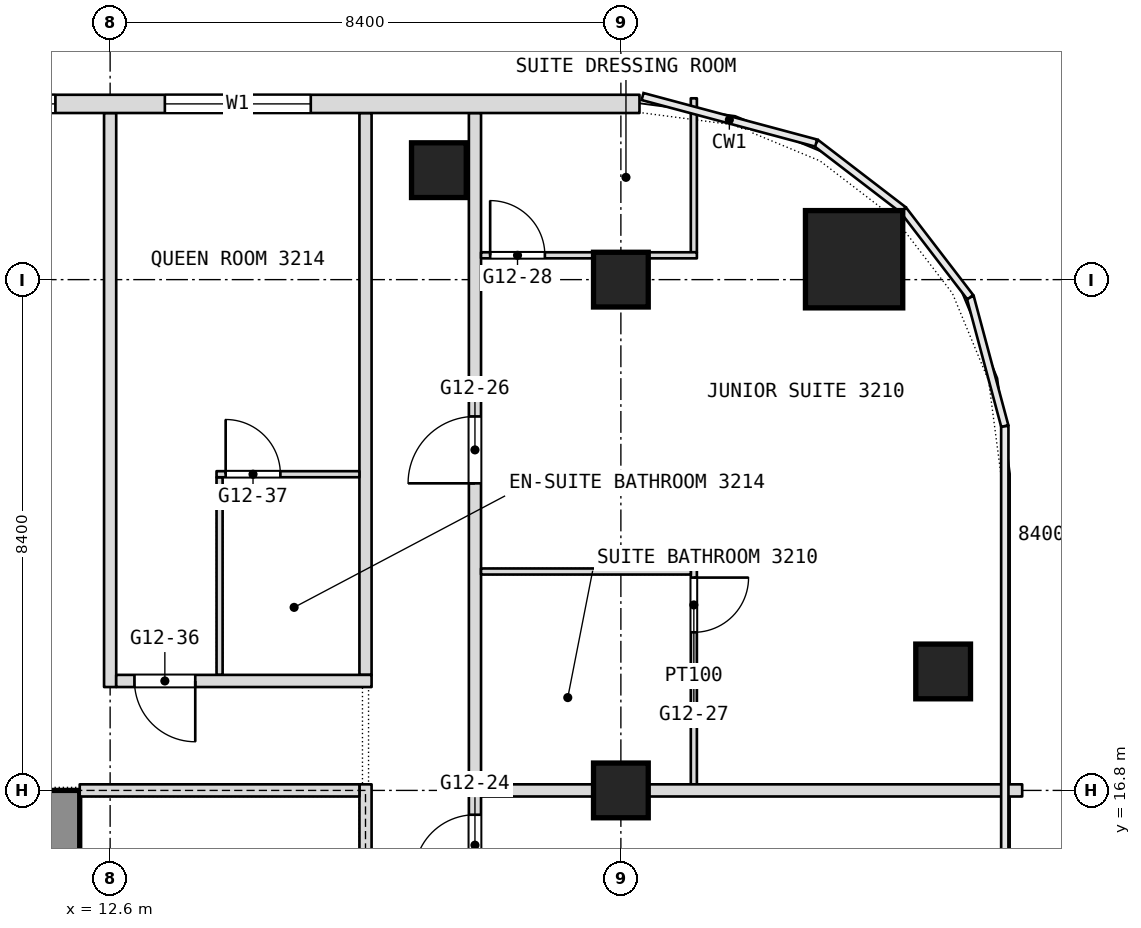
"""IFC4 building model, lengths in metres.
Left out: names, types, materials, properties, quantities, classifications, styles, units other than length and angle.
Written with IfcOpenShell. Run it as: python <this file> out.ifc"""

import sys

from ifc_helpers import new_model, si_unit, direction, frame, frame_2d, origin, origin_2d, place, context, subcontext, project, spatial, rectangle, extrude, element, fill, save


model = new_model("IFC4")
c1 = context("Model", 3, precision=1e-05, world=origin(), true_north=direction((0.0, 1.0)))
c2 = subcontext(c1, "Body", "Model", "MODEL_VIEW")
j1 = project(units=[si_unit("LENGTHUNIT", "METRE"), si_unit("PLANEANGLEUNIT", "RADIAN")], contexts=[c1])
p1 = place(None, origin())
s1 = spatial("IfcSite", under=j1, at=p1, CompositionType="ELEMENT")
p2 = place(p1, origin())
s2 = spatial("IfcBuilding", under=s1, at=p2, CompositionType="ELEMENT")
p3 = place(p2, frame((0.0, 0.0, 140.9)))
s3 = spatial("IfcBuildingStorey", under=s2, at=p3, CompositionType="ELEMENT", Elevation=140.9)
p4 = place(p3, frame((11.6, 0.0, 0.0), z_axis=(0.0, 0.0, 1.0), x_axis=(0.0, 1.0, 0.0)))
e1 = element("IfcWall", 1, at=p4, inside=s3, PredefinedType="SHEAR", context=c2, shape_type="SweptSolid", body=[
    extrude(rectangle(XDim=16.8, YDim=1.0, at=frame_2d((8.4, 0.0))), origin(), (0.0, 0.0, 1.0), 3.6),
])
p5 = place(p4, frame((2.3, 0.0, 0.0)))
e2 = element("IfcOpeningElement", 2, at=p5, cuts=e1, PredefinedType="OPENING", context=c2, shape_type="SweptSolid", body=[
    extrude(rectangle(XDim=1.1, YDim=2.1, at=frame_2d((0.55, 1.05))), frame((0.0, 0.5, 0.0), z_axis=(0.0, -1.0, 0.0), x_axis=(1.0, 0.0, 0.0)), (0.0, 0.0, 1.0), 1.0),
])
p6 = place(p4, frame((4.85, 0.0, 0.0)))
e3 = element("IfcOpeningElement", 3, at=p6, cuts=e1, PredefinedType="OPENING", context=c2, shape_type="SweptSolid", body=[
    extrude(rectangle(XDim=1.1, YDim=2.1, at=frame_2d((0.55, 1.05))), frame((0.0, 0.5, 0.0), z_axis=(0.0, -1.0, 0.0), x_axis=(1.0, 0.0, 0.0)), (0.0, 0.0, 1.0), 1.0),
])
p7 = place(p4, frame((6.825, 0.0, 0.0)))
e4 = element("IfcOpeningElement", 4, at=p7, cuts=e1, PredefinedType="OPENING", context=c2, shape_type="SweptSolid", body=[
    extrude(rectangle(XDim=1.2, YDim=2.1, at=frame_2d((0.6, 1.05))), frame((0.0, 0.5, 0.0), z_axis=(0.0, -1.0, 0.0), x_axis=(1.0, 0.0, 0.0)), (0.0, 0.0, 1.0), 1.0),
])
p8 = place(p4, frame((13.4, 0.0, 0.0)))
e5 = element("IfcOpeningElement", 5, at=p8, cuts=e1, PredefinedType="OPENING", context=c2, shape_type="SweptSolid", body=[
    extrude(rectangle(XDim=1.1, YDim=2.1, at=frame_2d((0.55, 1.05))), frame((0.0, 0.5, 0.0), z_axis=(0.0, -1.0, 0.0), x_axis=(1.0, 0.0, 0.0)), (0.0, 0.0, 1.0), 1.0),
])
p9 = place(p4, frame((10.85, 0.0, 0.0)))
e6 = element("IfcOpeningElement", 6, at=p9, cuts=e1, PredefinedType="OPENING", context=c2, shape_type="SweptSolid", body=[
    extrude(rectangle(XDim=1.1, YDim=2.1, at=frame_2d((0.55, 1.05))), frame((0.0, 0.5, 0.0), z_axis=(0.0, -1.0, 0.0), x_axis=(1.0, 0.0, 0.0)), (0.0, 0.0, 1.0), 1.0),
])
p10 = place(p4, frame((8.775, 0.0, 0.0)))
e7 = element("IfcOpeningElement", 7, at=p10, cuts=e1, PredefinedType="OPENING", context=c2, shape_type="SweptSolid", body=[
    extrude(rectangle(XDim=1.2, YDim=2.1, at=frame_2d((0.6, 1.05))), frame((0.0, 0.5, 0.0), z_axis=(0.0, -1.0, 0.0), x_axis=(1.0, 0.0, 0.0)), (0.0, 0.0, 1.0), 1.0),
])
p11 = place(p3, frame((24.835, 25.535, 0.0), z_axis=(0.0, 0.0, 1.0), x_axis=(1.0, 0.0, 0.0)))
e8 = element("IfcColumn", 8, at=p11, inside=s3, PredefinedType="COLUMN", context=c2, shape_type="SweptSolid", body=[
    extrude(rectangle(XDim=1.6, YDim=1.6, at=origin_2d()), origin(), (0.0, 0.0, 1.0), 3.6),
])
for number, where, z_axis, x_axis in (
    (9, (21.0, 16.8, 0.0), (0.0, 0.0, 1.0), (1.0, 0.0, 0.0)),
    (10, (21.0, 25.2, 0.0), (0.0, 0.0, 1.0), (1.0, 0.0, 0.0)),
    (11, (18.007, 27.0, 0.0), (0.0, 0.0, 1.0), (1.0, 0.0, 0.0)),
    (12, (26.3, 18.756, 0.0), (0.0, 0.0, 1.0), (1.0, 0.0, 0.0)),
):
    element("IfcColumn", number, at=place(p3, frame(where, z_axis=z_axis, x_axis=x_axis)), inside=s3, PredefinedType="COLUMN", context=c2, shape_type="SweptSolid", body=[
        extrude(rectangle(XDim=0.9, YDim=0.9, at=origin_2d()), origin(), (0.0, 0.0, 1.0), 3.6),
    ])
p12 = place(p3, frame((22.2, 16.9, 0.0), z_axis=(0.0, 0.0, 1.0), x_axis=(0.0, 1.0, 0.0)))
e13 = element("IfcWall", 13, at=p12, inside=s3, PredefinedType="PARTITIONING", context=c2, shape_type="SweptSolid", body=[
    extrude(rectangle(XDim=3.55, YDim=0.1, at=frame_2d((1.775, 0.0))), origin(), (0.0, 0.0, 1.0), 3.34),
])
p13 = place(p12, frame((2.5, 0.0, 0.0)))
e14 = element("IfcOpeningElement", 14, at=p13, cuts=e13, PredefinedType="OPENING", context=c2, shape_type="SweptSolid", body=[
    extrude(rectangle(XDim=0.9, YDim=2.1, at=frame_2d((0.45, 1.05))), frame((0.0, 0.05, 0.0), z_axis=(0.0, -1.0, 0.0), x_axis=(1.0, 0.0, 0.0)), (0.0, 0.0, 1.0), 0.1),
])
p14 = place(p3, frame((22.2, 25.65, 0.0), z_axis=(0.0, 0.0, 1.0), x_axis=(0.0, 1.0, 0.0)))
e15 = element("IfcWall", 15, at=p14, inside=s3, PredefinedType="PARTITIONING", context=c2, shape_type="SweptSolid", body=[
    extrude(rectangle(XDim=2.532, YDim=0.1, at=frame_2d((1.266, 0.0))), origin(), (0.0, 0.0, 1.0), 3.34),
])
p15 = place(p3, frame((18.6, -21.708, 0.0), z_axis=(0.0, 0.0, 1.0), x_axis=(0.0, 1.0, 0.0)))
e16 = element("IfcWall", 16, at=p15, inside=s3, PredefinedType="PARTITIONING", context=c2, shape_type="SweptSolid", body=[
    extrude(rectangle(XDim=49.648, YDim=0.2, at=frame_2d((24.824, 0.0))), origin(), (0.0, 0.0, 1.0), 3.34),
])
p16 = place(p15, frame((2.8, 0.0, 0.0)))
e17 = element("IfcOpeningElement", 17, at=p16, cuts=e16, PredefinedType="OPENING", context=c2, shape_type="SweptSolid", body=[
    extrude(rectangle(XDim=1.0, YDim=2.1, at=frame_2d((0.5, 1.05))), frame((0.0, 0.1, 0.0), z_axis=(0.0, -1.0, 0.0), x_axis=(1.0, 0.0, 0.0)), (0.0, 0.0, 1.0), 0.2),
])
p17 = place(p15, frame((7.708, 0.0, 0.0)))
e18 = element("IfcOpeningElement", 18, at=p17, cuts=e16, PredefinedType="OPENING", context=c2, shape_type="SweptSolid", body=[
    extrude(rectangle(XDim=1.0, YDim=2.1, at=frame_2d((0.5, 1.05))), frame((0.0, 0.1, 0.0), z_axis=(0.0, -1.0, 0.0), x_axis=(1.0, 0.0, 0.0)), (0.0, 0.0, 1.0), 0.2),
])
p18 = place(p15, frame((9.508, 0.0, 0.0)))
e19 = element("IfcOpeningElement", 19, at=p18, cuts=e16, PredefinedType="OPENING", context=c2, shape_type="SweptSolid", body=[
    extrude(rectangle(XDim=1.0, YDim=2.1, at=frame_2d((0.5, 1.05))), frame((0.0, 0.1, 0.0), z_axis=(0.0, -1.0, 0.0), x_axis=(1.0, 0.0, 0.0)), (0.0, 0.0, 1.0), 0.2),
])
p19 = place(p15, frame((13.708, 0.0, 0.0)))
e20 = element("IfcOpeningElement", 20, at=p19, cuts=e16, PredefinedType="OPENING", context=c2, shape_type="SweptSolid", body=[
    extrude(rectangle(XDim=1.0, YDim=2.1, at=frame_2d((0.5, 1.05))), frame((0.0, 0.1, 0.0), z_axis=(0.0, -1.0, 0.0), x_axis=(1.0, 0.0, 0.0)), (0.0, 0.0, 1.0), 0.2),
])
p20 = place(p15, frame((20.308, 0.0, 0.0)))
e21 = element("IfcOpeningElement", 21, at=p20, cuts=e16, PredefinedType="OPENING", context=c2, shape_type="SweptSolid", body=[
    extrude(rectangle(XDim=1.0, YDim=2.1, at=frame_2d((0.5, 1.05))), frame((0.0, 0.1, 0.0), z_axis=(0.0, -1.0, 0.0), x_axis=(1.0, 0.0, 0.0)), (0.0, 0.0, 1.0), 0.2),
])
p21 = place(p15, frame((24.508, 0.0, 0.0)))
e22 = element("IfcOpeningElement", 22, at=p21, cuts=e16, PredefinedType="OPENING", context=c2, shape_type="SweptSolid", body=[
    extrude(rectangle(XDim=1.0, YDim=2.1, at=frame_2d((0.5, 1.05))), frame((0.0, 0.1, 0.0), z_axis=(0.0, -1.0, 0.0), x_axis=(1.0, 0.0, 0.0)), (0.0, 0.0, 1.0), 0.2),
])
p22 = place(p15, frame((26.308, 0.0, 0.0)))
e23 = element("IfcOpeningElement", 23, at=p22, cuts=e16, PredefinedType="OPENING", context=c2, shape_type="SweptSolid", body=[
    extrude(rectangle(XDim=1.0, YDim=2.1, at=frame_2d((0.5, 1.05))), frame((0.0, 0.1, 0.0), z_axis=(0.0, -1.0, 0.0), x_axis=(1.0, 0.0, 0.0)), (0.0, 0.0, 1.0), 0.2),
])
p23 = place(p15, frame((30.508, 0.0, 0.0)))
e24 = element("IfcOpeningElement", 24, at=p23, cuts=e16, PredefinedType="OPENING", context=c2, shape_type="SweptSolid", body=[
    extrude(rectangle(XDim=1.0, YDim=2.1, at=frame_2d((0.5, 1.05))), frame((0.0, 0.1, 0.0), z_axis=(0.0, -1.0, 0.0), x_axis=(1.0, 0.0, 0.0)), (0.0, 0.0, 1.0), 0.2),
])
p24 = place(p15, frame((37.108, 0.0, 0.0)))
e25 = element("IfcOpeningElement", 25, at=p24, cuts=e16, PredefinedType="OPENING", context=c2, shape_type="SweptSolid", body=[
    extrude(rectangle(XDim=1.0, YDim=2.1, at=frame_2d((0.5, 1.05))), frame((0.0, 0.1, 0.0), z_axis=(0.0, -1.0, 0.0), x_axis=(1.0, 0.0, 0.0)), (0.0, 0.0, 1.0), 0.2),
])
p25 = place(p15, frame((43.558, 0.0, 0.0)))
e26 = element("IfcOpeningElement", 26, at=p25, cuts=e16, PredefinedType="OPENING", context=c2, shape_type="SweptSolid", body=[
    extrude(rectangle(XDim=1.1, YDim=2.1, at=frame_2d((0.55, 1.05))), frame((0.0, 0.1, 0.0), z_axis=(0.0, -1.0, 0.0), x_axis=(1.0, 0.0, 0.0)), (0.0, 0.0, 1.0), 0.2),
])
p26 = place(p3, frame((16.8, 18.7, 0.0), z_axis=(0.0, 0.0, 1.0), x_axis=(0.0, 1.0, 0.0)))
e27 = element("IfcWall", 27, at=p26, inside=s3, PredefinedType="PARTITIONING", context=c2, shape_type="SweptSolid", body=[
    extrude(rectangle(XDim=9.24, YDim=0.2, at=frame_2d((4.62, 0.0))), origin(), (0.0, 0.0, 1.0), 3.34),
])
p27 = place(p3, frame((14.4, 18.7, 0.0), z_axis=(0.0, 0.0, 1.0), x_axis=(0.0, 1.0, 0.0)))
e28 = element("IfcWall", 28, at=p27, inside=s3, PredefinedType="PARTITIONING", context=c2, shape_type="SweptSolid", body=[
    extrude(rectangle(XDim=3.25, YDim=0.1, at=frame_2d((1.625, 0.0))), origin(), (0.0, 0.0, 1.0), 3.34),
])
p28 = place(p3, frame((12.6, 18.5, 0.0), z_axis=(0.0, 0.0, 1.0), x_axis=(0.0, 1.0, 0.0)))
e29 = element("IfcWall", 29, at=p28, inside=s3, PredefinedType="PARTITIONING", context=c2, shape_type="SweptSolid", body=[
    extrude(rectangle(XDim=9.44, YDim=0.2, at=frame_2d((4.72, 0.0))), origin(), (0.0, 0.0, 1.0), 3.34),
])
p29 = place(p3, frame((18.7, 16.8, 0.0), z_axis=(0.0, 0.0, 1.0), x_axis=(1.0, 0.0, 0.0)))
e30 = element("IfcWall", 30, at=p29, inside=s3, PredefinedType="PARTITIONING", context=c2, shape_type="SweptSolid", body=[
    extrude(rectangle(XDim=8.9, YDim=0.2, at=frame_2d((4.45, 0.0))), origin(), (0.0, 0.0, 1.0), 2.89),
])
p30 = place(p3, frame((12.7, 18.6, 0.0), z_axis=(0.0, 0.0, 1.0), x_axis=(1.0, 0.0, 0.0)))
e31 = element("IfcWall", 31, at=p30, inside=s3, PredefinedType="PARTITIONING", context=c2, shape_type="SweptSolid", body=[
    extrude(rectangle(XDim=4.2, YDim=0.2, at=frame_2d((2.1, 0.0))), origin(), (0.0, 0.0, 1.0), 3.34),
])
p31 = place(p30, frame((0.3, 0.0, 0.0)))
e32 = element("IfcOpeningElement", 32, at=p31, cuts=e31, PredefinedType="OPENING", context=c2, shape_type="SweptSolid", body=[
    extrude(rectangle(XDim=1.0, YDim=2.1, at=frame_2d((0.5, 1.05))), frame((0.0, 0.1, 0.0), z_axis=(0.0, -1.0, 0.0), x_axis=(1.0, 0.0, 0.0)), (0.0, 0.0, 1.0), 0.2),
])
p32 = place(p3, frame((18.7, 20.4, 0.0), z_axis=(0.0, 0.0, 1.0), x_axis=(1.0, 0.0, 0.0)))
e33 = element("IfcWall", 33, at=p32, inside=s3, PredefinedType="PARTITIONING", context=c2, shape_type="SweptSolid", body=[
    extrude(rectangle(XDim=3.45, YDim=0.1, at=frame_2d((1.725, 0.0))), origin(), (0.0, 0.0, 1.0), 3.34),
])
p33 = place(p3, frame((14.35, 22.0, 0.0), z_axis=(0.0, 0.0, 1.0), x_axis=(1.0, 0.0, 0.0)))
e34 = element("IfcWall", 34, at=p33, inside=s3, PredefinedType="PARTITIONING", context=c2, shape_type="SweptSolid", body=[
    extrude(rectangle(XDim=2.35, YDim=0.1, at=frame_2d((1.175, 0.0))), origin(), (0.0, 0.0, 1.0), 3.34),
])
p34 = place(p33, frame((0.15, 0.0, 0.0)))
e35 = element("IfcOpeningElement", 35, at=p34, cuts=e34, PredefinedType="OPENING", context=c2, shape_type="SweptSolid", body=[
    extrude(rectangle(XDim=0.9, YDim=2.1, at=frame_2d((0.45, 1.05))), frame((0.0, 0.05, 0.0), z_axis=(0.0, -1.0, 0.0), x_axis=(1.0, 0.0, 0.0)), (0.0, 0.0, 1.0), 0.1),
])
p35 = place(p3, frame((18.7, 25.6, 0.0), z_axis=(0.0, 0.0, 1.0), x_axis=(1.0, 0.0, 0.0)))
e36 = element("IfcWall", 36, at=p35, inside=s3, PredefinedType="PARTITIONING", context=c2, shape_type="SweptSolid", body=[
    extrude(rectangle(XDim=3.55, YDim=0.1, at=frame_2d((1.775, 0.0))), origin(), (0.0, 0.0, 1.0), 3.34),
])
p36 = place(p35, frame((0.15, 0.0, 0.0)))
e37 = element("IfcOpeningElement", 37, at=p36, cuts=e36, PredefinedType="OPENING", context=c2, shape_type="SweptSolid", body=[
    extrude(rectangle(XDim=0.9, YDim=2.1, at=frame_2d((0.45, 1.05))), frame((0.0, 0.05, 0.0), z_axis=(0.0, -1.0, 0.0), x_axis=(1.0, 0.0, 0.0)), (0.0, 0.0, 1.0), 0.1),
])
p37 = place(p3, frame((21.306, 28.09, 0.0), z_axis=(0.0, 0.0, 1.0), x_axis=(-1.0, 0.0, 0.0)))
e38 = element("IfcWall", 38, at=p37, inside=s3, PredefinedType="NOTDEFINED", context=c2, shape_type="SweptSolid", body=[
    extrude(rectangle(XDim=42.612, YDim=0.3, at=frame_2d((21.306, 0.0))), origin(), (0.0, 0.0, 1.0), 3.6),
])
p38 = place(p37, frame((5.406, 0.0, 0.9)))
e39 = element("IfcOpeningElement", 39, at=p38, cuts=e38, PredefinedType="OPENING", context=c2, shape_type="SweptSolid", body=[
    extrude(rectangle(XDim=2.4, YDim=2.1, at=frame_2d((1.2, 1.05))), frame((0.0, 0.15, 0.0), z_axis=(0.0, -1.0, 0.0), x_axis=(1.0, 0.0, 0.0)), (0.0, 0.0, 1.0), 0.3),
])
p39 = place(p37, frame((9.606, 0.0, 0.9)))
e40 = element("IfcOpeningElement", 40, at=p39, cuts=e38, PredefinedType="OPENING", context=c2, shape_type="SweptSolid", body=[
    extrude(rectangle(XDim=2.4, YDim=2.1, at=frame_2d((1.2, 1.05))), frame((0.0, 0.15, 0.0), z_axis=(0.0, -1.0, 0.0), x_axis=(1.0, 0.0, 0.0)), (0.0, 0.0, 1.0), 0.3),
])
p40 = place(p37, frame((13.806, 0.0, 0.9)))
e41 = element("IfcOpeningElement", 41, at=p40, cuts=e38, PredefinedType="OPENING", context=c2, shape_type="SweptSolid", body=[
    extrude(rectangle(XDim=2.4, YDim=2.1, at=frame_2d((1.2, 1.05))), frame((0.0, 0.15, 0.0), z_axis=(0.0, -1.0, 0.0), x_axis=(1.0, 0.0, 0.0)), (0.0, 0.0, 1.0), 0.3),
])
p41 = place(p37, frame((18.006, 0.0, 0.9)))
e42 = element("IfcOpeningElement", 42, at=p41, cuts=e38, PredefinedType="OPENING", context=c2, shape_type="SweptSolid", body=[
    extrude(rectangle(XDim=2.4, YDim=2.1, at=frame_2d((1.2, 1.05))), frame((0.0, 0.15, 0.0), z_axis=(0.0, -1.0, 0.0), x_axis=(1.0, 0.0, 0.0)), (0.0, 0.0, 1.0), 0.3),
])
p42 = place(p37, frame((22.206, 0.0, 0.9)))
e43 = element("IfcOpeningElement", 43, at=p42, cuts=e38, PredefinedType="OPENING", context=c2, shape_type="SweptSolid", body=[
    extrude(rectangle(XDim=2.4, YDim=2.1, at=frame_2d((1.2, 1.05))), frame((0.0, 0.15, 0.0), z_axis=(0.0, -1.0, 0.0), x_axis=(1.0, 0.0, 0.0)), (0.0, 0.0, 1.0), 0.3),
])
p43 = place(p37, frame((26.406, 0.0, 0.9)))
e44 = element("IfcOpeningElement", 44, at=p43, cuts=e38, PredefinedType="OPENING", context=c2, shape_type="SweptSolid", body=[
    extrude(rectangle(XDim=2.4, YDim=2.1, at=frame_2d((1.2, 1.05))), frame((0.0, 0.15, 0.0), z_axis=(0.0, -1.0, 0.0), x_axis=(1.0, 0.0, 0.0)), (0.0, 0.0, 1.0), 0.3),
])
p44 = place(p37, frame((30.606, 0.0, 0.9)))
e45 = element("IfcOpeningElement", 45, at=p44, cuts=e38, PredefinedType="OPENING", context=c2, shape_type="SweptSolid", body=[
    extrude(rectangle(XDim=2.4, YDim=2.1, at=frame_2d((1.2, 1.05))), frame((0.0, 0.15, 0.0), z_axis=(0.0, -1.0, 0.0), x_axis=(1.0, 0.0, 0.0)), (0.0, 0.0, 1.0), 0.3),
])
p45 = place(p37, frame((34.806, 0.0, 0.9)))
e46 = element("IfcOpeningElement", 46, at=p45, cuts=e38, PredefinedType="OPENING", context=c2, shape_type="SweptSolid", body=[
    extrude(rectangle(XDim=2.4, YDim=2.1, at=frame_2d((1.2, 1.05))), frame((0.0, 0.15, 0.0), z_axis=(0.0, -1.0, 0.0), x_axis=(1.0, 0.0, 0.0)), (0.0, 0.0, 1.0), 0.3),
])
p46 = place(p3, frame((16.8, -0.1, 0.0), z_axis=(0.0, 0.0, 1.0), x_axis=(0.0, 1.0, 0.0)))
e47 = element("IfcWall", 47, at=p46, inside=s3, PredefinedType="PARTITIONING", context=c2, shape_type="SweptSolid", body=[
    extrude(rectangle(XDim=17.0, YDim=0.2, at=frame_2d((8.5, 0.0))), origin(), (0.0, 0.0, 1.0), 3.34),
])
p47 = place(p46, frame((2.2, 0.0, 0.0)))
e48 = element("IfcOpeningElement", 48, at=p47, cuts=e47, PredefinedType="OPENING", context=c2, shape_type="SweptSolid", body=[
    extrude(rectangle(XDim=1.8, YDim=2.1, at=frame_2d((0.9, 1.05))), frame((0.0, 0.1, 0.0), z_axis=(0.0, -1.0, 0.0), x_axis=(1.0, 0.0, 0.0)), (0.0, 0.0, 1.0), 0.2),
])
p48 = place(p46, frame((13.0, 0.0, 0.0)))
e49 = element("IfcOpeningElement", 49, at=p48, cuts=e47, PredefinedType="OPENING", context=c2, shape_type="SweptSolid", body=[
    extrude(rectangle(XDim=1.8, YDim=2.1, at=frame_2d((0.9, 1.05))), frame((0.0, 0.1, 0.0), z_axis=(0.0, -1.0, 0.0), x_axis=(1.0, 0.0, 0.0)), (0.0, 0.0, 1.0), 0.2),
])
p49 = place(p3, frame((12.1, 16.8, 0.0), z_axis=(0.0, 0.0, 1.0), x_axis=(1.0, 0.0, 0.0)))
e50 = element("IfcWall", 50, at=p49, inside=s3, PredefinedType="PARTITIONING", context=c2, shape_type="SweptSolid", body=[
    extrude(rectangle(XDim=4.6, YDim=0.2, at=frame_2d((2.3, 0.0))), origin(), (0.0, 0.0, 1.0), 2.89),
])
p50 = place(p13, origin())
e51 = element("IfcDoor", 51, at=p50, inside=s3, OperationType="SINGLE_SWING_RIGHT", PredefinedType="DOOR", context=c2, shape_type="SweptSolid", body=[
    extrude(rectangle(XDim=0.9, YDim=2.1, at=frame_2d((0.45, 1.05))), frame((0.0, 0.025, 0.0), z_axis=(0.0, -1.0, 0.0), x_axis=(1.0, 0.0, 0.0)), (0.0, 0.0, 1.0), 0.05),
])
fill(e14, e51)
p51 = place(p24, origin())
e52 = element("IfcDoor", 52, at=p51, inside=s3, OperationType="SINGLE_SWING_RIGHT", PredefinedType="DOOR", context=c2, shape_type="SweptSolid", body=[
    extrude(rectangle(XDim=1.0, YDim=2.1, at=frame_2d((0.5, 1.05))), frame((0.0, 0.025, 0.0), z_axis=(0.0, -1.0, 0.0), x_axis=(1.0, 0.0, 0.0)), (0.0, 0.0, 1.0), 0.05),
])
fill(e25, e52)
p52 = place(p25, origin())
e53 = element("IfcDoor", 53, at=p52, inside=s3, OperationType="SINGLE_SWING_RIGHT", PredefinedType="DOOR", context=c2, shape_type="SweptSolid", body=[
    extrude(rectangle(XDim=1.1, YDim=2.1, at=frame_2d((0.55, 1.05))), frame((0.0, 0.025, 0.0), z_axis=(0.0, -1.0, 0.0), x_axis=(1.0, 0.0, 0.0)), (0.0, 0.0, 1.0), 0.05),
])
fill(e26, e53)
p53 = place(p31, origin())
e54 = element("IfcDoor", 54, at=p53, inside=s3, OperationType="SINGLE_SWING_LEFT", PredefinedType="DOOR", context=c2, shape_type="SweptSolid", body=[
    extrude(rectangle(XDim=1.0, YDim=2.1, at=frame_2d((0.5, 1.05))), frame((0.0, 0.025, 0.0), z_axis=(0.0, -1.0, 0.0), x_axis=(1.0, 0.0, 0.0)), (0.0, 0.0, 1.0), 0.05),
])
fill(e32, e54)
p54 = place(p34, origin())
e55 = element("IfcDoor", 55, at=p54, inside=s3, OperationType="SINGLE_SWING_RIGHT", PredefinedType="DOOR", context=c2, shape_type="SweptSolid", body=[
    extrude(rectangle(XDim=0.9, YDim=2.1, at=frame_2d((0.45, 1.05))), frame((0.0, 0.025, 0.0), z_axis=(0.0, -1.0, 0.0), x_axis=(1.0, 0.0, 0.0)), (0.0, 0.0, 1.0), 0.05),
])
fill(e35, e55)
p55 = place(p36, origin())
e56 = element("IfcDoor", 56, at=p55, inside=s3, OperationType="SINGLE_SWING_LEFT", PredefinedType="DOOR", context=c2, shape_type="SweptSolid", body=[
    extrude(rectangle(XDim=0.9, YDim=2.1, at=frame_2d((0.45, 1.05))), frame((0.0, 0.025, 0.0), z_axis=(0.0, -1.0, 0.0), x_axis=(1.0, 0.0, 0.0)), (0.0, 0.0, 1.0), 0.05),
])
fill(e37, e56)
p56 = place(p38, origin())
e57 = element("IfcWindow", 57, at=p56, inside=s3, PartitioningType="SINGLE_PANEL", PredefinedType="WINDOW", context=c2, shape_type="SweptSolid", body=[
    extrude(rectangle(XDim=2.4, YDim=2.1, at=frame_2d((1.2, 1.05))), frame((0.0, 0.03, 0.0), z_axis=(0.0, -1.0, 0.0), x_axis=(1.0, 0.0, 0.0)), (0.0, 0.0, 1.0), 0.06),
])
fill(e39, e57)
p57 = place(p39, origin())
e58 = element("IfcWindow", 58, at=p57, inside=s3, PartitioningType="SINGLE_PANEL", PredefinedType="WINDOW", context=c2, shape_type="SweptSolid", body=[
    extrude(rectangle(XDim=2.4, YDim=2.1, at=frame_2d((1.2, 1.05))), frame((0.0, 0.03, 0.0), z_axis=(0.0, -1.0, 0.0), x_axis=(1.0, 0.0, 0.0)), (0.0, 0.0, 1.0), 0.06),
])
fill(e40, e58)
save(model, sys.argv[1])
